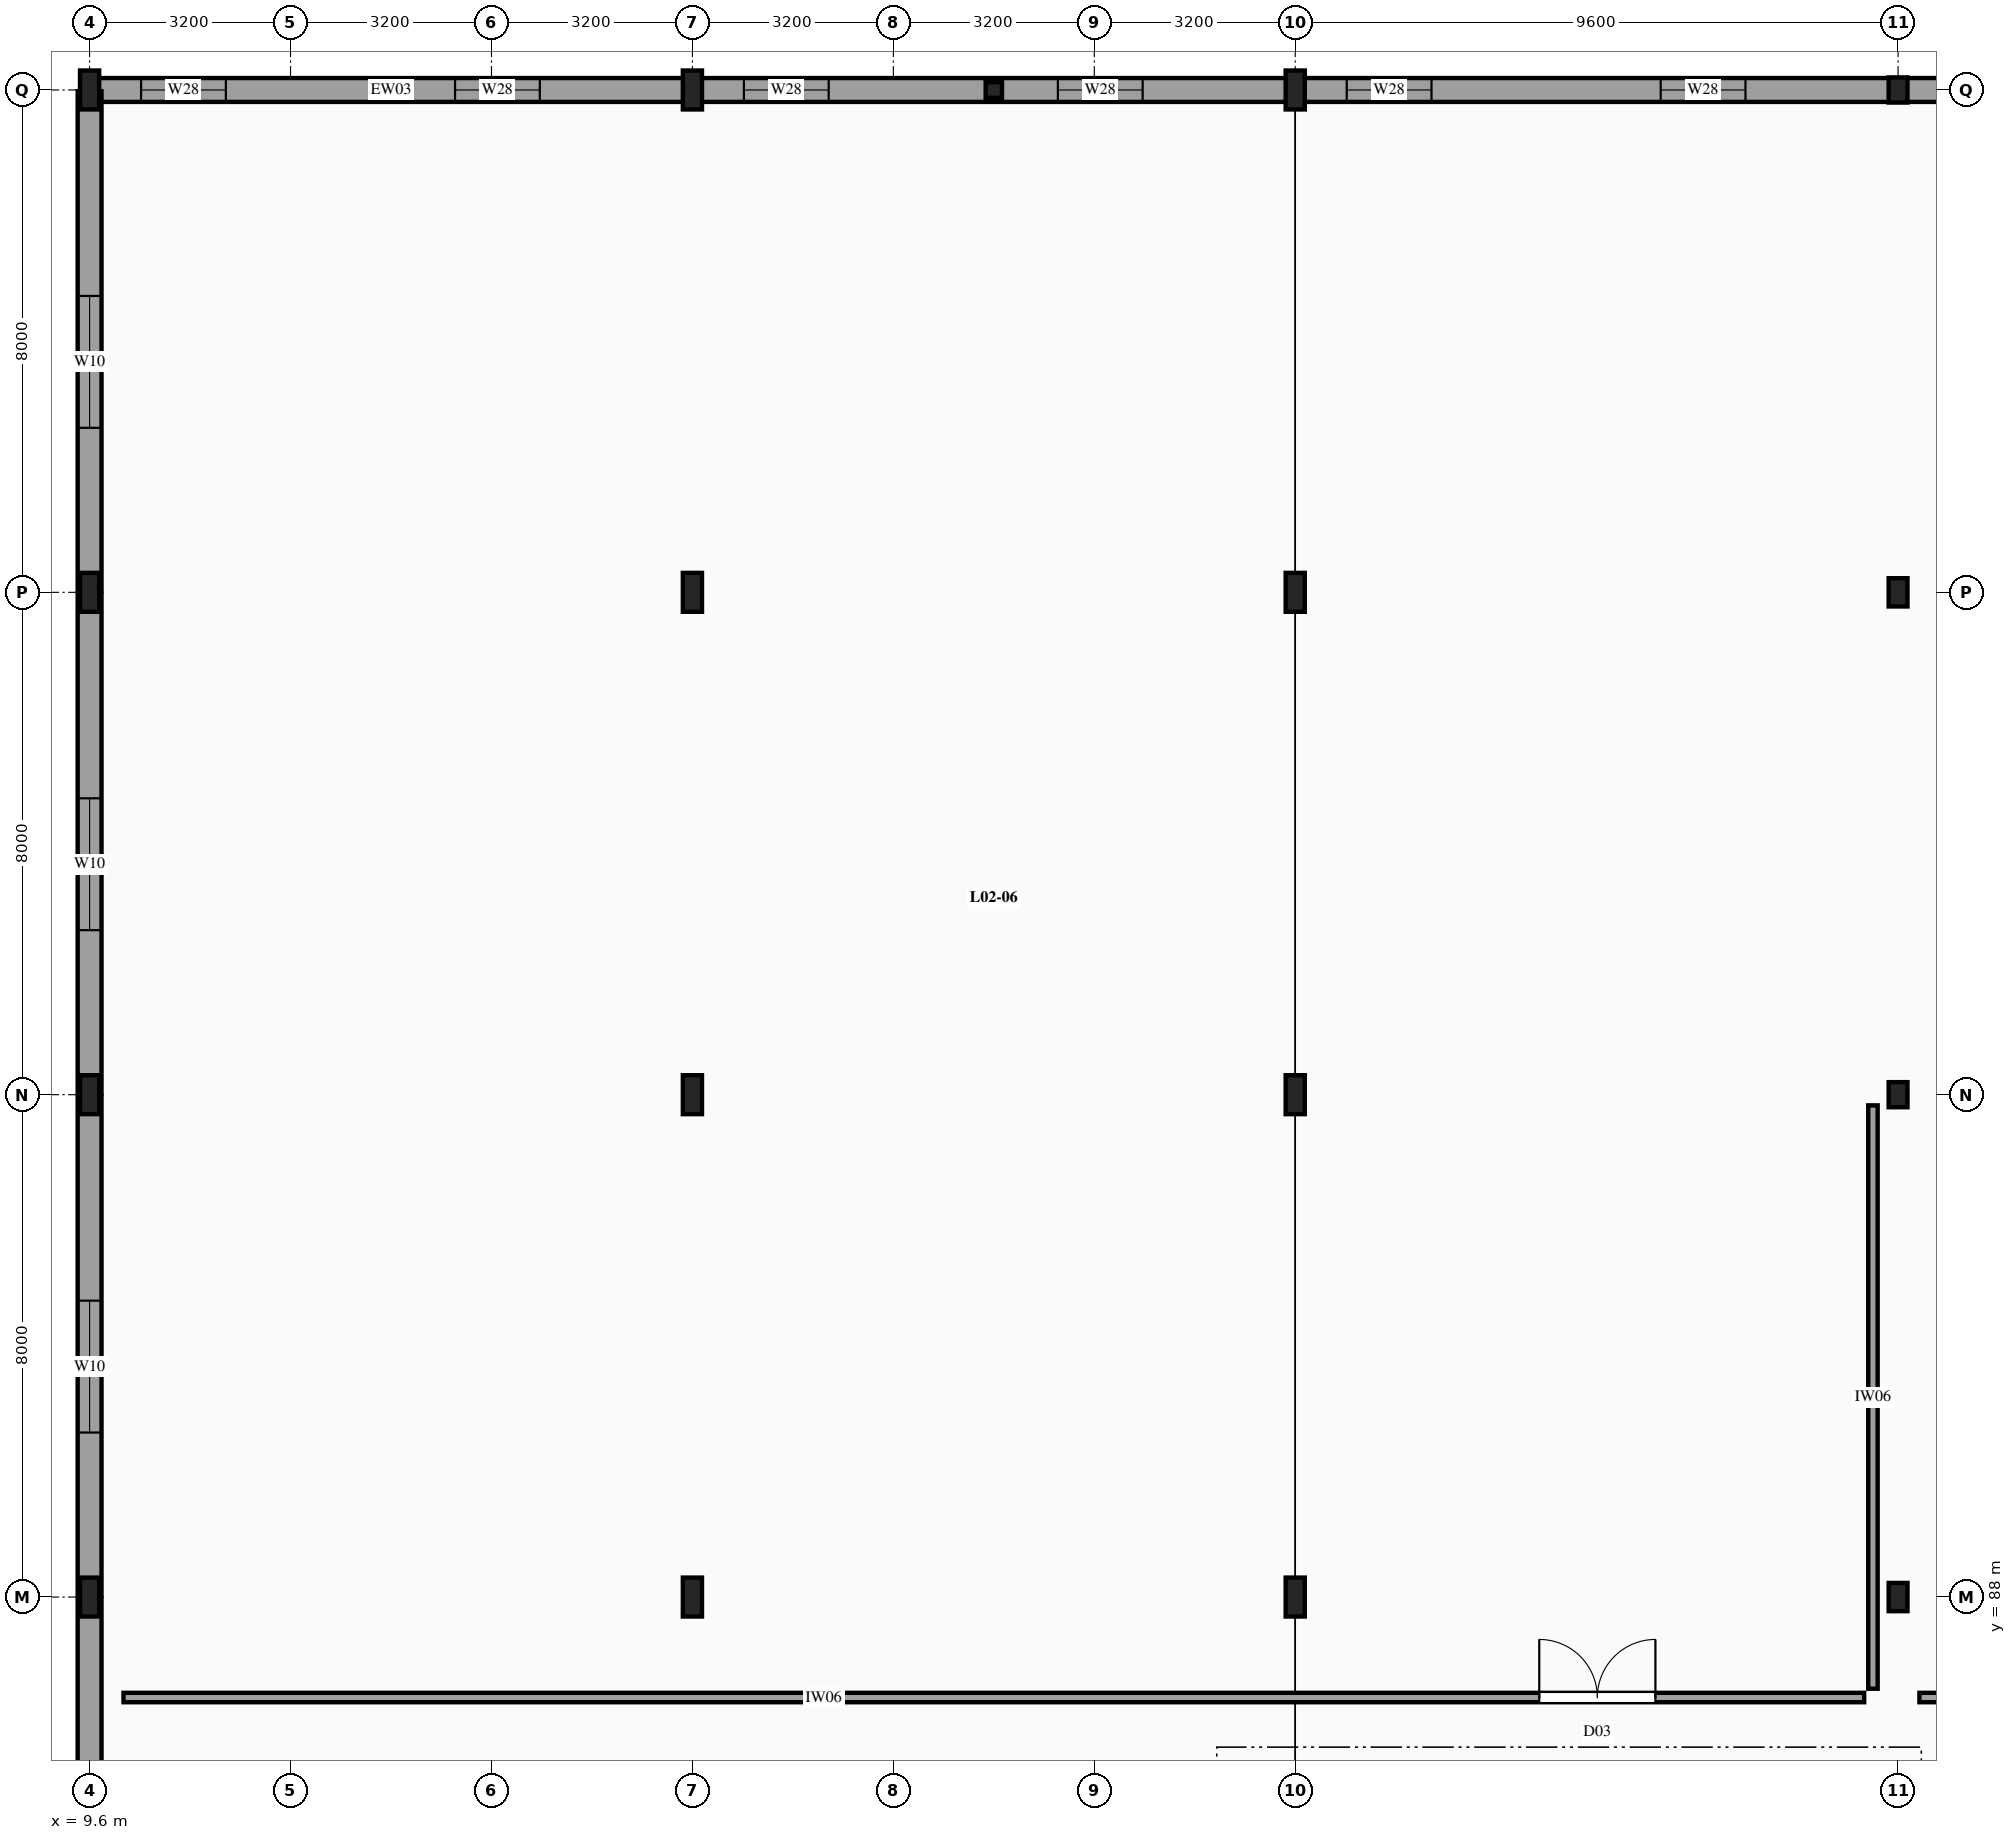
"""IFC4 building model, lengths in metres.
Left out: names, types, materials, properties, quantities, classifications, styles, units other than length and angle.
Written with IfcOpenShell. Run it as: python <this file> out.ifc"""

import sys

from ifc_helpers import new_model, si_unit, direction, frame, frame_2d, origin, origin_2d, place, context, subcontext, project, spatial, rectangle, i_section, extrude, element, fill, save


model = new_model("IFC4")
c1 = context("Model", 3, precision=1e-05, world=origin(), true_north=direction((0.0, 1.0)))
c2 = subcontext(c1, "Body", "Model", "MODEL_VIEW")
j1 = project(units=[si_unit("LENGTHUNIT", "METRE"), si_unit("PLANEANGLEUNIT", "RADIAN")], contexts=[c1])
p1 = place(None, origin())
s1 = spatial("IfcSite", under=j1, at=p1, CompositionType="ELEMENT")
p2 = place(p1, origin())
s2 = spatial("IfcBuilding", under=s1, at=p2, CompositionType="ELEMENT")
p3 = place(p2, frame((0.0, 0.0, 8.7)))
s3 = spatial("IfcBuildingStorey", under=s2, at=p3, CompositionType="ELEMENT", Elevation=8.7)
for number, where, z_axis, x_axis in (
    (1, (9.6, 88.0, -0.26), (0.0, 0.0, 1.0), (1.0, 0.0, 0.0)),
    (2, (9.6, 96.0, -0.26), (0.0, 0.0, 1.0), (1.0, 0.0, 0.0)),
    (3, (9.6, 104.0, -0.26), (0.0, 0.0, 1.0), (1.0, 0.0, 0.0)),
    (4, (9.6, 112.0, -0.26), (0.0, 0.0, 1.0), (1.0, 0.0, 0.0)),
    (5, (19.2, 88.0, -0.26), (0.0, 0.0, 1.0), (1.0, 0.0, 0.0)),
    (6, (19.2, 96.0, -0.26), (0.0, 0.0, 1.0), (1.0, 0.0, 0.0)),
    (7, (19.2, 104.0, -0.26), (0.0, 0.0, 1.0), (1.0, 0.0, 0.0)),
    (8, (19.2, 112.0, -0.26), (0.0, 0.0, 1.0), (1.0, 0.0, 0.0)),
    (9, (28.8, 88.0, -0.26), (0.0, 0.0, 1.0), (1.0, 0.0, 0.0)),
    (10, (28.8, 96.0, -0.26), (0.0, 0.0, 1.0), (1.0, 0.0, 0.0)),
    (11, (28.8, 104.0, -0.26), (0.0, 0.0, 1.0), (1.0, 0.0, 0.0)),
    (12, (28.8, 112.0, -0.26), (0.0, 0.0, 1.0), (1.0, 0.0, 0.0)),
):
    element("IfcColumn", number, at=place(p3, frame(where, z_axis=z_axis, x_axis=x_axis)), inside=s3, PredefinedType="COLUMN", context=c2, shape_type="SweptSolid", body=[
        extrude(i_section(OverallWidth=0.305, OverallDepth=0.62, WebThickness=0.021, FlangeThickness=0.04, FilletRadius=0.027, at=origin_2d()), origin(), (0.0, 0.0, 1.0), 4.2),
    ])
p4 = place(p3, frame((38.4, 88.0, -0.26), z_axis=(0.0, 0.0, 1.0), x_axis=(1.0, 0.0, 0.0)))
e13 = element("IfcColumn", 13, at=p4, inside=s3, PredefinedType="COLUMN", context=c2, shape_type="SweptSolid", body=[
    extrude(i_section(OverallWidth=0.3, OverallDepth=0.45, WebThickness=0.014, FlangeThickness=0.026, FilletRadius=0.027, at=origin_2d()), origin(), (0.0, 0.0, 1.0), 4.2),
])
p5 = place(p3, frame((38.4, 96.0, -0.26), z_axis=(0.0, 0.0, 1.0), x_axis=(1.0, 0.0, 0.0)))
e14 = element("IfcColumn", 14, at=p5, inside=s3, PredefinedType="COLUMN", context=c2, shape_type="SweptSolid", body=[
    extrude(i_section(OverallWidth=0.3, OverallDepth=0.4, WebThickness=0.013, FlangeThickness=0.024, FilletRadius=0.027, at=origin_2d()), origin(), (0.0, 0.0, 1.0), 4.2),
])
p6 = place(p3, frame((38.4, 104.0, -0.26), z_axis=(0.0, 0.0, 1.0), x_axis=(1.0, 0.0, 0.0)))
e15 = element("IfcColumn", 15, at=p6, inside=s3, PredefinedType="COLUMN", context=c2, shape_type="SweptSolid", body=[
    extrude(i_section(OverallWidth=0.3, OverallDepth=0.45, WebThickness=0.014, FlangeThickness=0.026, FilletRadius=0.027, at=origin_2d()), origin(), (0.0, 0.0, 1.0), 4.2),
])
p7 = place(p3, frame((38.4, 112.0, -0.26), z_axis=(0.0, 0.0, 1.0), x_axis=(1.0, 0.0, 0.0)))
e16 = element("IfcColumn", 16, at=p7, inside=s3, PredefinedType="COLUMN", context=c2, shape_type="SweptSolid", body=[
    extrude(i_section(OverallWidth=0.3, OverallDepth=0.4, WebThickness=0.013, FlangeThickness=0.024, FilletRadius=0.027, at=origin_2d()), origin(), (0.0, 0.0, 1.0), 4.2),
])
for number, where, z_axis, x_axis in (
    (17, (14.4, 112.0, -0.26), (0.0, 0.0, 1.0), (1.0, 0.0, 0.0)),
    (18, (24.0, 112.0, -0.26), (0.0, 0.0, 1.0), (1.0, 0.0, 0.0)),
):
    element("IfcColumn", number, at=place(p3, frame(where, z_axis=z_axis, x_axis=x_axis)), inside=s3, PredefinedType="PILASTER", context=c2, shape_type="SweptSolid", body=[
        extrude(i_section(OverallWidth=0.26, OverallDepth=0.25, WebThickness=0.008, FlangeThickness=0.012, FilletRadius=0.024, at=origin_2d()), origin(), (0.0, 0.0, 1.0), 4.2),
    ])
p8 = place(p3, frame((9.62, 112.0, 0.0), z_axis=(0.0, 0.0, 1.0), x_axis=(1.0, 0.0, 0.0)))
e19 = element("IfcWall", 19, at=p8, inside=s3, PredefinedType="SOLIDWALL", context=c2, shape_type="SweptSolid", body=[
    extrude(rectangle(XDim=9.56, YDim=0.38, at=frame_2d((4.78, 0.0))), origin(), (0.0, 0.0, 1.0), 3.02),
])
p9 = place(p8, frame((0.8, 0.0, 0.72)))
e20 = element("IfcOpeningElement", 20, at=p9, cuts=e19, PredefinedType="OPENING", context=c2, shape_type="SweptSolid", body=[
    extrude(rectangle(XDim=1.35, YDim=1.7, at=frame_2d((0.675, 0.85))), frame((0.0, 0.2, 0.0), z_axis=(0.0, -1.0, 0.0), x_axis=(1.0, 0.0, 0.0)), (0.0, 0.0, 1.0), 0.4),
])
p10 = place(p8, frame((5.8, 0.0, 0.72)))
e21 = element("IfcOpeningElement", 21, at=p10, cuts=e19, PredefinedType="OPENING", context=c2, shape_type="SweptSolid", body=[
    extrude(rectangle(XDim=1.35, YDim=1.7, at=frame_2d((0.675, 0.85))), frame((0.0, 0.2, 0.0), z_axis=(0.0, -1.0, 0.0), x_axis=(1.0, 0.0, 0.0)), (0.0, 0.0, 1.0), 0.4),
])
p11 = place(p3, frame((19.22, 112.0, 0.0), z_axis=(0.0, 0.0, 1.0), x_axis=(1.0, 0.0, 0.0)))
e22 = element("IfcWall", 22, at=p11, inside=s3, PredefinedType="SOLIDWALL", context=c2, shape_type="SweptSolid", body=[
    extrude(rectangle(XDim=9.56, YDim=0.38, at=frame_2d((4.78, 0.0))), origin(), (0.0, 0.0, 1.0), 3.02),
])
p12 = place(p11, frame((0.8, 0.0, 0.72)))
e23 = element("IfcOpeningElement", 23, at=p12, cuts=e22, PredefinedType="OPENING", context=c2, shape_type="SweptSolid", body=[
    extrude(rectangle(XDim=1.35, YDim=1.7, at=frame_2d((0.675, 0.85))), frame((0.0, 0.2, 0.0), z_axis=(0.0, -1.0, 0.0), x_axis=(1.0, 0.0, 0.0)), (0.0, 0.0, 1.0), 0.4),
])
p13 = place(p11, frame((5.8, 0.0, 0.72)))
e24 = element("IfcOpeningElement", 24, at=p13, cuts=e22, PredefinedType="OPENING", context=c2, shape_type="SweptSolid", body=[
    extrude(rectangle(XDim=1.35, YDim=1.7, at=frame_2d((0.675, 0.85))), frame((0.0, 0.2, 0.0), z_axis=(0.0, -1.0, 0.0), x_axis=(1.0, 0.0, 0.0)), (0.0, 0.0, 1.0), 0.4),
])
p14 = place(p3, frame((28.82, 112.0, 0.0), z_axis=(0.0, 0.0, 1.0), x_axis=(1.0, 0.0, 0.0)))
e25 = element("IfcWall", 25, at=p14, inside=s3, PredefinedType="SOLIDWALL", context=c2, shape_type="SweptSolid", body=[
    extrude(rectangle(XDim=9.56, YDim=0.38, at=frame_2d((4.78, 0.0))), origin(), (0.0, 0.0, 1.0), 3.02),
])
p15 = place(p14, frame((0.8, 0.0, 0.72)))
e26 = element("IfcOpeningElement", 26, at=p15, cuts=e25, PredefinedType="OPENING", context=c2, shape_type="SweptSolid", body=[
    extrude(rectangle(XDim=1.35, YDim=1.7, at=frame_2d((0.675, 0.85))), frame((0.0, 0.2, 0.0), z_axis=(0.0, -1.0, 0.0), x_axis=(1.0, 0.0, 0.0)), (0.0, 0.0, 1.0), 0.4),
])
p16 = place(p14, frame((5.8, 0.0, 0.72)))
e27 = element("IfcOpeningElement", 27, at=p16, cuts=e25, PredefinedType="OPENING", context=c2, shape_type="SweptSolid", body=[
    extrude(rectangle(XDim=1.35, YDim=1.7, at=frame_2d((0.675, 0.85))), frame((0.0, 0.2, 0.0), z_axis=(0.0, -1.0, 0.0), x_axis=(1.0, 0.0, 0.0)), (0.0, 0.0, 1.0), 0.4),
])
p17 = place(p3, frame((38.42, 112.0, 0.0), z_axis=(0.0, 0.0, 1.0), x_axis=(1.0, 0.0, 0.0)))
e28 = element("IfcWall", 28, at=p17, inside=s3, PredefinedType="SOLIDWALL", context=c2, shape_type="SweptSolid", body=[
    extrude(rectangle(XDim=9.56, YDim=0.38, at=frame_2d((4.78, 0.0))), origin(), (0.0, 0.0, 1.0), 3.36),
])
p18 = place(p3, frame((9.6, 80.02, 0.0), z_axis=(0.0, 0.0, 1.0), x_axis=(0.0, 1.0, 0.0)))
e29 = element("IfcWall", 29, at=p18, inside=s3, PredefinedType="SOLIDWALL", context=c2, shape_type="SweptSolid", body=[
    extrude(rectangle(XDim=7.96, YDim=0.38, at=frame_2d((3.98, 0.0))), origin(), (0.0, 0.0, 1.0), 3.36),
])
p19 = place(p18, frame((2.6, 0.0, 0.9)))
e30 = element("IfcOpeningElement", 30, at=p19, cuts=e29, PredefinedType="OPENING", context=c2, shape_type="SweptSolid", body=[
    extrude(rectangle(XDim=2.1, YDim=2.1, at=frame_2d((1.05, 1.05))), frame((0.0, 0.2, 0.0), z_axis=(0.0, -1.0, 0.0), x_axis=(1.0, 0.0, 0.0)), (0.0, 0.0, 1.0), 0.4),
])
p20 = place(p3, frame((9.6, 88.02, 0.0), z_axis=(0.0, 0.0, 1.0), x_axis=(0.0, 1.0, 0.0)))
e31 = element("IfcWall", 31, at=p20, inside=s3, PredefinedType="SOLIDWALL", context=c2, shape_type="SweptSolid", body=[
    extrude(rectangle(XDim=7.96, YDim=0.38, at=frame_2d((3.98, 0.0))), origin(), (0.0, 0.0, 1.0), 3.36),
])
p21 = place(p20, frame((2.6, 0.0, 0.9)))
e32 = element("IfcOpeningElement", 32, at=p21, cuts=e31, PredefinedType="OPENING", context=c2, shape_type="SweptSolid", body=[
    extrude(rectangle(XDim=2.1, YDim=2.1, at=frame_2d((1.05, 1.05))), frame((0.0, 0.2, 0.0), z_axis=(0.0, -1.0, 0.0), x_axis=(1.0, 0.0, 0.0)), (0.0, 0.0, 1.0), 0.4),
])
p22 = place(p3, frame((9.6, 96.02, 0.0), z_axis=(0.0, 0.0, 1.0), x_axis=(0.0, 1.0, 0.0)))
e33 = element("IfcWall", 33, at=p22, inside=s3, PredefinedType="SOLIDWALL", context=c2, shape_type="SweptSolid", body=[
    extrude(rectangle(XDim=7.96, YDim=0.38, at=frame_2d((3.98, 0.0))), origin(), (0.0, 0.0, 1.0), 3.36),
])
p23 = place(p22, frame((2.6, 0.0, 0.9)))
e34 = element("IfcOpeningElement", 34, at=p23, cuts=e33, PredefinedType="OPENING", context=c2, shape_type="SweptSolid", body=[
    extrude(rectangle(XDim=2.1, YDim=2.1, at=frame_2d((1.05, 1.05))), frame((0.0, 0.2, 0.0), z_axis=(0.0, -1.0, 0.0), x_axis=(1.0, 0.0, 0.0)), (0.0, 0.0, 1.0), 0.4),
])
p24 = place(p3, frame((9.6, 104.02, 0.0), z_axis=(0.0, 0.0, 1.0), x_axis=(0.0, 1.0, 0.0)))
e35 = element("IfcWall", 35, at=p24, inside=s3, PredefinedType="SOLIDWALL", context=c2, shape_type="SweptSolid", body=[
    extrude(rectangle(XDim=7.96, YDim=0.38, at=frame_2d((3.98, 0.0))), origin(), (0.0, 0.0, 1.0), 3.36),
])
p25 = place(p24, frame((2.6, 0.0, 0.9)))
e36 = element("IfcOpeningElement", 36, at=p25, cuts=e35, PredefinedType="OPENING", context=c2, shape_type="SweptSolid", body=[
    extrude(rectangle(XDim=2.1, YDim=2.1, at=frame_2d((1.05, 1.05))), frame((0.0, 0.2, 0.0), z_axis=(0.0, -1.0, 0.0), x_axis=(1.0, 0.0, 0.0)), (0.0, 0.0, 1.0), 0.4),
])
p26 = place(p3, frame((10.14, 86.4, 0.0), z_axis=(0.0, 0.0, 1.0), x_axis=(1.0, 0.0, 0.0)))
e37 = element("IfcWall", 37, at=p26, inside=s3, PredefinedType="PARTITIONING", context=c2, shape_type="SweptSolid", body=[
    extrude(rectangle(XDim=27.72, YDim=0.15, at=frame_2d((13.86, 0.0))), origin(), (0.0, 0.0, 1.0), 3.1),
])
p27 = place(p26, frame((22.546, 0.0, 0.0)))
e38 = element("IfcOpeningElement", 38, at=p27, cuts=e37, PredefinedType="OPENING", context=c2, shape_type="SweptSolid", body=[
    extrude(rectangle(XDim=1.85, YDim=2.5, at=frame_2d((0.925, 1.25))), frame((0.0, 0.085, 0.0), z_axis=(0.0, -1.0, 0.0), x_axis=(1.0, 0.0, 0.0)), (0.0, 0.0, 1.0), 0.17),
])
p28 = place(p3, frame((38.0, 86.54, 0.0), z_axis=(0.0, 0.0, 1.0), x_axis=(0.0, 1.0, 0.0)))
e39 = element("IfcWall", 39, at=p28, inside=s3, PredefinedType="PARTITIONING", context=c2, shape_type="SweptSolid", body=[
    extrude(rectangle(XDim=9.29, YDim=0.15, at=frame_2d((4.645, 0.0))), origin(), (0.0, 0.0, 1.0), 3.1),
])
p29 = place(p3, frame((38.74, 86.4, 0.0), z_axis=(0.0, 0.0, 1.0), x_axis=(1.0, 0.0, 0.0)))
e40 = element("IfcWall", 40, at=p29, inside=s3, PredefinedType="PARTITIONING", context=c2, shape_type="SweptSolid", body=[
    extrude(rectangle(XDim=18.32, YDim=0.15, at=frame_2d((9.16, 0.0))), origin(), (0.0, 0.0, 1.0), 3.1),
])
p30 = place(p29, frame((3.375, 0.0, 0.0)))
e41 = element("IfcOpeningElement", 41, at=p30, cuts=e40, PredefinedType="OPENING", context=c2, shape_type="SweptSolid", body=[
    extrude(rectangle(XDim=2.1, YDim=2.65, at=frame_2d((1.05, 1.325))), frame((0.0, 0.085, 0.0), z_axis=(0.0, -1.0, 0.0), x_axis=(1.0, 0.0, 0.0)), (0.0, 0.0, 1.0), 0.17),
])
p31 = place(p9, origin())
e42 = element("IfcWindow", 42, at=p31, inside=s3, PartitioningType="SINGLE_PANEL", PredefinedType="WINDOW", context=c2, shape_type="SweptSolid", body=[
    extrude(rectangle(XDim=1.35, YDim=1.7, at=frame_2d((0.675, 0.85))), frame((0.0, 0.03, 0.0), z_axis=(0.0, -1.0, 0.0), x_axis=(1.0, 0.0, 0.0)), (0.0, 0.0, 1.0), 0.06),
])
fill(e20, e42)
p32 = place(p10, origin())
e43 = element("IfcWindow", 43, at=p32, inside=s3, PartitioningType="SINGLE_PANEL", PredefinedType="WINDOW", context=c2, shape_type="SweptSolid", body=[
    extrude(rectangle(XDim=1.35, YDim=1.7, at=frame_2d((0.675, 0.85))), frame((0.0, 0.03, 0.0), z_axis=(0.0, -1.0, 0.0), x_axis=(1.0, 0.0, 0.0)), (0.0, 0.0, 1.0), 0.06),
])
fill(e21, e43)
p33 = place(p12, origin())
e44 = element("IfcWindow", 44, at=p33, inside=s3, PartitioningType="SINGLE_PANEL", PredefinedType="WINDOW", context=c2, shape_type="SweptSolid", body=[
    extrude(rectangle(XDim=1.35, YDim=1.7, at=frame_2d((0.675, 0.85))), frame((0.0, 0.03, 0.0), z_axis=(0.0, -1.0, 0.0), x_axis=(1.0, 0.0, 0.0)), (0.0, 0.0, 1.0), 0.06),
])
fill(e23, e44)
p34 = place(p13, origin())
e45 = element("IfcWindow", 45, at=p34, inside=s3, PartitioningType="SINGLE_PANEL", PredefinedType="WINDOW", context=c2, shape_type="SweptSolid", body=[
    extrude(rectangle(XDim=1.35, YDim=1.7, at=frame_2d((0.675, 0.85))), frame((0.0, 0.03, 0.0), z_axis=(0.0, -1.0, 0.0), x_axis=(1.0, 0.0, 0.0)), (0.0, 0.0, 1.0), 0.06),
])
fill(e24, e45)
p35 = place(p15, origin())
e46 = element("IfcWindow", 46, at=p35, inside=s3, PartitioningType="SINGLE_PANEL", PredefinedType="WINDOW", context=c2, shape_type="SweptSolid", body=[
    extrude(rectangle(XDim=1.35, YDim=1.7, at=frame_2d((0.675, 0.85))), frame((0.0, 0.03, 0.0), z_axis=(0.0, -1.0, 0.0), x_axis=(1.0, 0.0, 0.0)), (0.0, 0.0, 1.0), 0.06),
])
fill(e26, e46)
p36 = place(p16, origin())
e47 = element("IfcWindow", 47, at=p36, inside=s3, PartitioningType="SINGLE_PANEL", PredefinedType="WINDOW", context=c2, shape_type="SweptSolid", body=[
    extrude(rectangle(XDim=1.35, YDim=1.7, at=frame_2d((0.675, 0.85))), frame((0.0, 0.03, 0.0), z_axis=(0.0, -1.0, 0.0), x_axis=(1.0, 0.0, 0.0)), (0.0, 0.0, 1.0), 0.06),
])
fill(e27, e47)
p37 = place(p21, origin())
e48 = element("IfcWindow", 48, at=p37, inside=s3, PartitioningType="SINGLE_PANEL", PredefinedType="WINDOW", context=c2, shape_type="SweptSolid", body=[
    extrude(rectangle(XDim=2.1, YDim=2.1, at=frame_2d((1.05, 1.05))), frame((0.0, 0.03, 0.0), z_axis=(0.0, -1.0, 0.0), x_axis=(1.0, 0.0, 0.0)), (0.0, 0.0, 1.0), 0.06),
])
fill(e32, e48)
p38 = place(p23, origin())
e49 = element("IfcWindow", 49, at=p38, inside=s3, PartitioningType="SINGLE_PANEL", PredefinedType="WINDOW", context=c2, shape_type="SweptSolid", body=[
    extrude(rectangle(XDim=2.1, YDim=2.1, at=frame_2d((1.05, 1.05))), frame((0.0, 0.03, 0.0), z_axis=(0.0, -1.0, 0.0), x_axis=(1.0, 0.0, 0.0)), (0.0, 0.0, 1.0), 0.06),
])
fill(e34, e49)
p39 = place(p25, origin())
e50 = element("IfcWindow", 50, at=p39, inside=s3, PartitioningType="SINGLE_PANEL", PredefinedType="WINDOW", context=c2, shape_type="SweptSolid", body=[
    extrude(rectangle(XDim=2.1, YDim=2.1, at=frame_2d((1.05, 1.05))), frame((0.0, 0.03, 0.0), z_axis=(0.0, -1.0, 0.0), x_axis=(1.0, 0.0, 0.0)), (0.0, 0.0, 1.0), 0.06),
])
fill(e36, e50)
p40 = place(p27, origin())
e51 = element("IfcDoor", 51, at=p40, inside=s3, OperationType="DOUBLE_DOOR_SINGLE_SWING", PredefinedType="DOOR", context=c2, shape_type="SweptSolid", body=[
    extrude(rectangle(XDim=1.85, YDim=2.5, at=frame_2d((0.925, 1.25))), frame((0.0, 0.025, 0.0), z_axis=(0.0, -1.0, 0.0), x_axis=(1.0, 0.0, 0.0)), (0.0, 0.0, 1.0), 0.05),
])
fill(e38, e51)
save(model, sys.argv[1])
